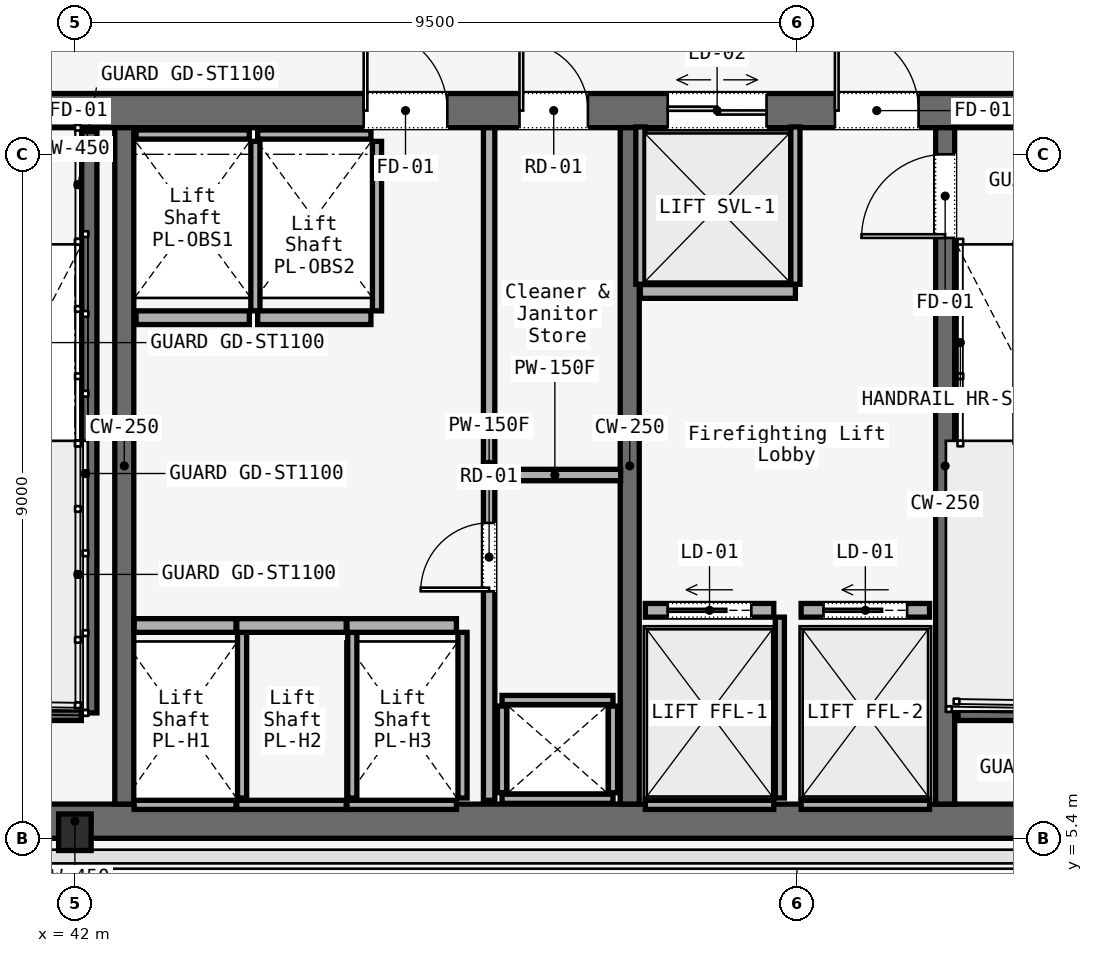
"""IFC4 building model, lengths in metres.
Left out: names, types, materials, properties, quantities, classifications, styles, units other than length and angle.
Written with IfcOpenShell. Run it as: python <this file> out.ifc"""

import sys

from ifc_helpers import new_model, si_unit, direction, frame, frame_2d, origin, origin_2d, place, context, subcontext, project, spatial, rectangle, i_section, extrude, element, fill, save


model = new_model("IFC4")
c1 = context("Model", 3, precision=1e-05, world=origin(), true_north=direction((0.0, 1.0)))
c2 = subcontext(c1, "Body", "Model", "MODEL_VIEW")
j1 = project(units=[si_unit("LENGTHUNIT", "METRE"), si_unit("PLANEANGLEUNIT", "RADIAN")], contexts=[c1])
p1 = place(None, origin())
s1 = spatial("IfcSite", under=j1, at=p1, CompositionType="ELEMENT")
p2 = place(p1, origin())
s2 = spatial("IfcBuilding", under=s1, at=p2, CompositionType="ELEMENT")
p3 = place(p2, frame((0.0, 0.0, 130.8)))
s3 = spatial("IfcBuildingStorey", under=s2, at=p3, CompositionType="ELEMENT", Elevation=130.8)
p4 = place(p3, frame((26.45, 14.975, 0.0), z_axis=(0.0, 0.0, 1.0), x_axis=(1.0, 0.0, 0.0)))
e1 = element("IfcWall", 1, at=p4, inside=s3, PredefinedType="SOLIDWALL", context=c2, shape_type="SweptSolid", body=[
    extrude(rectangle(XDim=31.1, YDim=0.45, at=frame_2d((15.55, 0.0))), origin(), (0.0, 0.0, 1.0), 3.58),
])
p5 = place(p4, frame((1.65, 0.0, 0.0)))
e2 = element("IfcOpeningElement", 2, at=p5, cuts=e1, PredefinedType="OPENING", context=c2, shape_type="SweptSolid", body=[
    extrude(rectangle(XDim=1.1, YDim=2.2, at=frame_2d((0.55, 1.1))), frame((0.0, 0.225, 0.0), z_axis=(0.0, -1.0, 0.0), x_axis=(1.0, 0.0, 0.0)), (0.0, 0.0, 1.0), 0.45),
])
p6 = place(p4, frame((13.65, 0.0, 0.0)))
e3 = element("IfcOpeningElement", 3, at=p6, cuts=e1, PredefinedType="OPENING", context=c2, shape_type="SweptSolid", body=[
    extrude(rectangle(XDim=1.1, YDim=2.2, at=frame_2d((0.55, 1.1))), frame((0.0, 0.225, 0.0), z_axis=(0.0, -1.0, 0.0), x_axis=(1.0, 0.0, 0.0)), (0.0, 0.0, 1.0), 0.45),
])
p7 = place(p4, frame((25.55, 0.0, 0.0)))
e4 = element("IfcOpeningElement", 4, at=p7, cuts=e1, PredefinedType="OPENING", context=c2, shape_type="SweptSolid", body=[
    extrude(rectangle(XDim=1.1, YDim=2.2, at=frame_2d((0.55, 1.1))), frame((0.0, 0.225, 0.0), z_axis=(0.0, -1.0, 0.0), x_axis=(1.0, 0.0, 0.0)), (0.0, 0.0, 1.0), 0.45),
])
p8 = place(p4, frame((10.7, 0.0, 0.0)))
e5 = element("IfcOpeningElement", 5, at=p8, cuts=e1, PredefinedType="OPENING", context=c2, shape_type="SweptSolid", body=[
    extrude(rectangle(XDim=1.4, YDim=2.2, at=frame_2d((0.7, 1.1))), frame((0.0, 0.225, 0.0), z_axis=(0.0, -1.0, 0.0), x_axis=(1.0, 0.0, 0.0)), (0.0, 0.0, 1.0), 0.45),
])
p9 = place(p4, frame((19.35, 0.0, 0.0)))
e6 = element("IfcOpeningElement", 6, at=p9, cuts=e1, PredefinedType="OPENING", context=c2, shape_type="SweptSolid", body=[
    extrude(rectangle(XDim=1.1, YDim=2.2, at=frame_2d((0.55, 1.1))), frame((0.0, 0.225, 0.0), z_axis=(0.0, -1.0, 0.0), x_axis=(1.0, 0.0, 0.0)), (0.0, 0.0, 1.0), 0.45),
])
p10 = place(p4, frame((21.4, 0.0, 0.0)))
e7 = element("IfcOpeningElement", 7, at=p10, cuts=e1, PredefinedType="OPENING", context=c2, shape_type="SweptSolid", body=[
    extrude(rectangle(XDim=0.9, YDim=2.1, at=frame_2d((0.45, 1.05))), frame((0.0, 0.225, 0.0), z_axis=(0.0, -1.0, 0.0), x_axis=(1.0, 0.0, 0.0)), (0.0, 0.0, 1.0), 0.45),
])
p11 = place(p4, frame((23.35, 0.0, 0.0)))
e8 = element("IfcOpeningElement", 8, at=p11, cuts=e1, PredefinedType="OPENING", context=c2, shape_type="SweptSolid", body=[
    extrude(rectangle(XDim=1.3, YDim=2.3, at=frame_2d((0.65, 1.15))), frame((0.0, 0.225, 0.0), z_axis=(0.0, -1.0, 0.0), x_axis=(1.0, 0.0, 0.0)), (0.0, 0.0, 1.0), 0.45),
])
p12 = place(p3, frame((26.45, 5.625, 0.0), z_axis=(0.0, 0.0, 1.0), x_axis=(1.0, 0.0, 0.0)))
e9 = element("IfcWall", 9, at=p12, inside=s3, PredefinedType="SOLIDWALL", context=c2, shape_type="SweptSolid", body=[
    extrude(rectangle(XDim=31.1, YDim=0.45, at=frame_2d((15.55, 0.0))), origin(), (0.0, 0.0, 1.0), 3.58),
])
for number, where, z_axis, x_axis in (
    (10, (42.65, 5.85, 0.0), (0.0, 0.0, 1.0), (0.0, 1.0, 0.0)),
    (11, (49.3, 5.85, 0.0), (0.0, 0.0, 1.0), (0.0, 1.0, 0.0)),
):
    element("IfcWall", number, at=place(p3, frame(where, z_axis=z_axis, x_axis=x_axis)), inside=s3, PredefinedType="SOLIDWALL", context=c2, shape_type="SweptSolid", body=[
        extrude(rectangle(XDim=8.9, YDim=0.25, at=frame_2d((4.45, 0.0))), origin(), (0.0, 0.0, 1.0), 3.58),
    ])
p13 = place(p3, frame((53.45, 5.85, 0.0), z_axis=(0.0, 0.0, 1.0), x_axis=(0.0, 1.0, 0.0)))
e12 = element("IfcWall", 12, at=p13, inside=s3, PredefinedType="SOLIDWALL", context=c2, shape_type="SweptSolid", body=[
    extrude(rectangle(XDim=8.9, YDim=0.25, at=frame_2d((4.45, 0.0))), origin(), (0.0, 0.0, 1.0), 3.58),
])
p14 = place(p13, frame((7.45, 0.0, 0.0)))
e13 = element("IfcOpeningElement", 13, at=p14, cuts=e12, PredefinedType="OPENING", context=c2, shape_type="SweptSolid", body=[
    extrude(rectangle(XDim=1.1, YDim=2.2, at=frame_2d((0.55, 1.1))), frame((0.0, 0.125, 0.0), z_axis=(0.0, -1.0, 0.0), x_axis=(1.0, 0.0, 0.0)), (0.0, 0.0, 1.0), 0.25),
])
p15 = place(p3, frame((42.0, 5.48, 0.0), z_axis=(0.0, 0.0, 1.0), x_axis=(1.0, 0.0, 0.0)))
e14 = element("IfcColumn", 14, at=p15, inside=s3, PredefinedType="COLUMN", context=c2, shape_type="SweptSolid", body=[
    extrude(i_section(OverallWidth=0.428, OverallDepth=0.481, WebThickness=0.051, FlangeThickness=0.065, FilletRadius=0.015, at=origin_2d()), origin(), (0.0, 0.0, 1.0), 3.58),
])
p16 = place(p3, frame((42.19, 14.7, 0.0), z_axis=(0.0, 0.0, 1.0), x_axis=(0.0, -1.0, 0.0)))
e15 = element("IfcWall", 15, at=p16, inside=s3, PredefinedType="SOLIDWALL", context=c2, shape_type="SweptSolid", body=[
    extrude(rectangle(XDim=7.65, YDim=0.2, at=frame_2d((3.825, 0.0))), origin(), (0.0, 0.0, 1.0), 3.8),
])
for number, where, z_axis, x_axis in (
    (16, (38.97, 7.05, 0.0), (0.0, 0.0, 1.0), (1.0, 0.0, 0.0)),
    (17, (53.62, 7.05, 0.0), (0.0, 0.0, 1.0), (1.0, 0.0, 0.0)),
):
    element("IfcWall", number, at=place(p3, frame(where, z_axis=z_axis, x_axis=x_axis)), inside=s3, PredefinedType="SOLIDWALL", context=c2, shape_type="SweptSolid", body=[
        extrude(rectangle(XDim=3.115, YDim=0.2, at=frame_2d((1.558, 0.0))), origin(), (0.0, 0.0, 1.0), 3.8),
    ])
for number, where, z_axis, x_axis in (
    (18, (47.62, 5.92, 0.0), (0.0, 0.0, 1.0), (1.0, 0.0, 0.0)),
    (19, (47.62, 7.22, 0.0), (0.0, 0.0, 1.0), (1.0, 0.0, 0.0)),
):
    element("IfcWall", number, at=place(p3, frame(where, z_axis=z_axis, x_axis=x_axis)), inside=s3, PredefinedType="SOLIDWALL", context=c2, shape_type="SweptSolid", body=[
        extrude(rectangle(XDim=1.46, YDim=0.12, at=frame_2d((0.73, 0.0))), origin(), (0.0, 0.0, 1.0), 3.01),
    ])
for number, where, z_axis, x_axis in (
    (20, (47.62, 6.0, 0.0), (0.0, 0.0, 1.0), (0.0, 1.0, 0.0)),
    (21, (49.08, 6.0, 0.0), (0.0, 0.0, 1.0), (0.0, 1.0, 0.0)),
):
    element("IfcWall", number, at=place(p3, frame(where, z_axis=z_axis, x_axis=x_axis)), inside=s3, PredefinedType="SOLIDWALL", context=c2, shape_type="SweptSolid", body=[
        extrude(rectangle(XDim=1.14, YDim=0.12, at=frame_2d((0.57, 0.0))), origin(), (0.0, 0.0, 1.0), 3.01),
    ])
p17 = place(p3, frame((47.45, 5.9, 0.0), z_axis=(0.0, 0.0, 1.0), x_axis=(0.0, 1.0, 0.0)))
e22 = element("IfcWall", 22, at=p17, inside=s3, PredefinedType="PARTITIONING", context=c2, shape_type="SweptSolid", body=[
    extrude(rectangle(XDim=8.85, YDim=0.15, at=frame_2d((4.425, 0.0))), origin(), (0.0, 0.0, 1.0), 3.01),
])
p18 = place(p17, frame((2.75, 0.0, 0.0)))
e23 = element("IfcOpeningElement", 23, at=p18, cuts=e22, PredefinedType="OPENING", context=c2, shape_type="SweptSolid", body=[
    extrude(rectangle(XDim=0.9, YDim=2.1, at=frame_2d((0.45, 1.05))), frame((0.0, 0.075, 0.0), z_axis=(0.0, -1.0, 0.0), x_axis=(1.0, 0.0, 0.0)), (0.0, 0.0, 1.0), 0.15),
])
p19 = place(p3, frame((47.45, 10.18, 0.0), z_axis=(0.0, 0.0, 1.0), x_axis=(1.0, 0.0, 0.0)))
e24 = element("IfcWall", 24, at=p19, inside=s3, PredefinedType="PARTITIONING", context=c2, shape_type="SweptSolid", body=[
    extrude(rectangle(XDim=1.73, YDim=0.15, at=frame_2d((0.865, 0.0))), origin(), (0.0, 0.0, 1.0), 3.01),
])
p20 = place(p3, frame((42.78, 8.2, 0.0), z_axis=(0.0, 0.0, 1.0), x_axis=(1.0, 0.0, 0.0)))
e25 = element("IfcWall", 25, at=p20, inside=s3, PredefinedType="SOLIDWALL", context=c2, shape_type="SweptSolid", body=[
    extrude(rectangle(XDim=1.34, YDim=0.18, at=frame_2d((0.67, 0.0))), origin(), (0.0, 0.0, 1.0), 3.01),
])
p21 = place(p3, frame((42.78, 5.84, 0.0), z_axis=(0.0, 0.0, 1.0), x_axis=(1.0, 0.0, 0.0)))
e26 = element("IfcWall", 26, at=p21, inside=s3, PredefinedType="SOLIDWALL", context=c2, shape_type="SweptSolid", body=[
    extrude(rectangle(XDim=1.34, YDim=0.12, at=frame_2d((0.67, 0.0))), origin(), (0.0, 0.0, 1.0), 3.01),
])
p22 = place(p3, frame((44.2, 5.93, 0.0), z_axis=(0.0, 0.0, 1.0), x_axis=(0.0, 1.0, 0.0)))
e27 = element("IfcWall", 27, at=p22, inside=s3, PredefinedType="SOLIDWALL", context=c2, shape_type="SweptSolid", body=[
    extrude(rectangle(XDim=2.18, YDim=0.12, at=frame_2d((1.09, 0.0))), origin(), (0.0, 0.0, 1.0), 3.01),
])
p23 = place(p3, frame((44.13, 8.2, 0.0), z_axis=(0.0, 0.0, 1.0), x_axis=(1.0, 0.0, 0.0)))
e28 = element("IfcWall", 28, at=p23, inside=s3, PredefinedType="SOLIDWALL", context=c2, shape_type="SweptSolid", body=[
    extrude(rectangle(XDim=1.44, YDim=0.18, at=frame_2d((0.72, 0.0))), origin(), (0.0, 0.0, 1.0), 3.01),
])
p24 = place(p3, frame((44.13, 5.84, 0.0), z_axis=(0.0, 0.0, 1.0), x_axis=(1.0, 0.0, 0.0)))
e29 = element("IfcWall", 29, at=p24, inside=s3, PredefinedType="SOLIDWALL", context=c2, shape_type="SweptSolid", body=[
    extrude(rectangle(XDim=1.44, YDim=0.12, at=frame_2d((0.72, 0.0))), origin(), (0.0, 0.0, 1.0), 3.01),
])
p25 = place(p3, frame((45.65, 5.93, 0.0), z_axis=(0.0, 0.0, 1.0), x_axis=(0.0, 1.0, 0.0)))
e30 = element("IfcWall", 30, at=p25, inside=s3, PredefinedType="SOLIDWALL", context=c2, shape_type="SweptSolid", body=[
    extrude(rectangle(XDim=2.18, YDim=0.12, at=frame_2d((1.09, 0.0))), origin(), (0.0, 0.0, 1.0), 3.01),
])
p26 = place(p3, frame((45.58, 8.2, 0.0), z_axis=(0.0, 0.0, 1.0), x_axis=(1.0, 0.0, 0.0)))
e31 = element("IfcWall", 31, at=p26, inside=s3, PredefinedType="SOLIDWALL", context=c2, shape_type="SweptSolid", body=[
    extrude(rectangle(XDim=1.44, YDim=0.18, at=frame_2d((0.72, 0.0))), origin(), (0.0, 0.0, 1.0), 3.01),
])
p27 = place(p3, frame((45.58, 5.84, 0.0), z_axis=(0.0, 0.0, 1.0), x_axis=(1.0, 0.0, 0.0)))
e32 = element("IfcWall", 32, at=p27, inside=s3, PredefinedType="SOLIDWALL", context=c2, shape_type="SweptSolid", body=[
    extrude(rectangle(XDim=1.44, YDim=0.12, at=frame_2d((0.72, 0.0))), origin(), (0.0, 0.0, 1.0), 3.01),
])
p28 = place(p3, frame((47.1, 5.93, 0.0), z_axis=(0.0, 0.0, 1.0), x_axis=(0.0, 1.0, 0.0)))
e33 = element("IfcWall", 33, at=p28, inside=s3, PredefinedType="SOLIDWALL", context=c2, shape_type="SweptSolid", body=[
    extrude(rectangle(XDim=2.18, YDim=0.12, at=frame_2d((1.09, 0.0))), origin(), (0.0, 0.0, 1.0), 3.01),
])
p29 = place(p3, frame((42.805, 12.25, 0.0), z_axis=(0.0, 0.0, 1.0), x_axis=(1.0, 0.0, 0.0)))
e34 = element("IfcWall", 34, at=p29, inside=s3, PredefinedType="SOLIDWALL", context=c2, shape_type="SweptSolid", body=[
    extrude(rectangle(XDim=1.49, YDim=0.18, at=frame_2d((0.745, 0.0))), origin(), (0.0, 0.0, 1.0), 3.01),
])
p30 = place(p3, frame((42.805, 14.66, 0.0), z_axis=(0.0, 0.0, 1.0), x_axis=(1.0, 0.0, 0.0)))
e35 = element("IfcWall", 35, at=p30, inside=s3, PredefinedType="SOLIDWALL", context=c2, shape_type="SweptSolid", body=[
    extrude(rectangle(XDim=1.49, YDim=0.12, at=frame_2d((0.745, 0.0))), origin(), (0.0, 0.0, 1.0), 3.01),
])
p31 = place(p3, frame((44.375, 12.34, 0.0), z_axis=(0.0, 0.0, 1.0), x_axis=(0.0, 1.0, 0.0)))
e36 = element("IfcWall", 36, at=p31, inside=s3, PredefinedType="SOLIDWALL", context=c2, shape_type="SweptSolid", body=[
    extrude(rectangle(XDim=2.23, YDim=0.12, at=frame_2d((1.115, 0.0))), origin(), (0.0, 0.0, 1.0), 3.01),
])
p32 = place(p3, frame((44.405, 12.25, 0.0), z_axis=(0.0, 0.0, 1.0), x_axis=(1.0, 0.0, 0.0)))
e37 = element("IfcWall", 37, at=p32, inside=s3, PredefinedType="SOLIDWALL", context=c2, shape_type="SweptSolid", body=[
    extrude(rectangle(XDim=1.49, YDim=0.18, at=frame_2d((0.745, 0.0))), origin(), (0.0, 0.0, 1.0), 3.01),
])
p33 = place(p3, frame((44.405, 14.66, 0.0), z_axis=(0.0, 0.0, 1.0), x_axis=(1.0, 0.0, 0.0)))
e38 = element("IfcWall", 38, at=p33, inside=s3, PredefinedType="SOLIDWALL", context=c2, shape_type="SweptSolid", body=[
    extrude(rectangle(XDim=1.49, YDim=0.12, at=frame_2d((0.745, 0.0))), origin(), (0.0, 0.0, 1.0), 3.01),
])
p34 = place(p3, frame((45.975, 12.34, 0.0), z_axis=(0.0, 0.0, 1.0), x_axis=(0.0, 1.0, 0.0)))
e39 = element("IfcWall", 39, at=p34, inside=s3, PredefinedType="SOLIDWALL", context=c2, shape_type="SweptSolid", body=[
    extrude(rectangle(XDim=2.23, YDim=0.12, at=frame_2d((1.115, 0.0))), origin(), (0.0, 0.0, 1.0), 3.01),
])
p35 = place(p3, frame((49.505, 8.4, 0.0), z_axis=(0.0, 0.0, 1.0), x_axis=(1.0, 0.0, 0.0)))
e40 = element("IfcWall", 40, at=p35, inside=s3, PredefinedType="SOLIDWALL", context=c2, shape_type="SweptSolid", body=[
    extrude(rectangle(XDim=1.69, YDim=0.18, at=frame_2d((0.845, 0.0))), origin(), (0.0, 0.0, 1.0), 3.01),
])
p36 = place(p35, frame((0.295, 0.0, 0.0)))
e41 = element("IfcOpeningElement", 41, at=p36, cuts=e40, PredefinedType="OPENING", context=c2, shape_type="SweptSolid", body=[
    extrude(rectangle(XDim=1.1, YDim=2.2, at=frame_2d((0.55, 1.1))), frame((0.0, 0.09, 0.0), z_axis=(0.0, -1.0, 0.0), x_axis=(1.0, 0.0, 0.0)), (0.0, 0.0, 1.0), 0.18),
])
p37 = place(p3, frame((49.505, 5.84, 0.0), z_axis=(0.0, 0.0, 1.0), x_axis=(1.0, 0.0, 0.0)))
e42 = element("IfcWall", 42, at=p37, inside=s3, PredefinedType="SOLIDWALL", context=c2, shape_type="SweptSolid", body=[
    extrude(rectangle(XDim=1.69, YDim=0.12, at=frame_2d((0.845, 0.0))), origin(), (0.0, 0.0, 1.0), 3.01),
])
p38 = place(p3, frame((51.275, 5.93, 0.0), z_axis=(0.0, 0.0, 1.0), x_axis=(0.0, 1.0, 0.0)))
e43 = element("IfcWall", 43, at=p38, inside=s3, PredefinedType="SOLIDWALL", context=c2, shape_type="SweptSolid", body=[
    extrude(rectangle(XDim=2.38, YDim=0.12, at=frame_2d((1.19, 0.0))), origin(), (0.0, 0.0, 1.0), 3.01),
])
p39 = place(p3, frame((51.555, 8.4, 0.0), z_axis=(0.0, 0.0, 1.0), x_axis=(1.0, 0.0, 0.0)))
e44 = element("IfcWall", 44, at=p39, inside=s3, PredefinedType="SOLIDWALL", context=c2, shape_type="SweptSolid", body=[
    extrude(rectangle(XDim=1.69, YDim=0.18, at=frame_2d((0.845, 0.0))), origin(), (0.0, 0.0, 1.0), 3.01),
])
p40 = place(p39, frame((0.295, 0.0, 0.0)))
e45 = element("IfcOpeningElement", 45, at=p40, cuts=e44, PredefinedType="OPENING", context=c2, shape_type="SweptSolid", body=[
    extrude(rectangle(XDim=1.1, YDim=2.2, at=frame_2d((0.55, 1.1))), frame((0.0, 0.09, 0.0), z_axis=(0.0, -1.0, 0.0), x_axis=(1.0, 0.0, 0.0)), (0.0, 0.0, 1.0), 0.18),
])
p41 = place(p3, frame((51.555, 5.84, 0.0), z_axis=(0.0, 0.0, 1.0), x_axis=(1.0, 0.0, 0.0)))
e46 = element("IfcWall", 46, at=p41, inside=s3, PredefinedType="SOLIDWALL", context=c2, shape_type="SweptSolid", body=[
    extrude(rectangle(XDim=1.69, YDim=0.12, at=frame_2d((0.845, 0.0))), origin(), (0.0, 0.0, 1.0), 3.01),
])
p42 = place(p3, frame((49.44, 12.595, 0.0), z_axis=(0.0, 0.0, 1.0), x_axis=(1.0, 0.0, 0.0)))
e47 = element("IfcWall", 47, at=p42, inside=s3, PredefinedType="SOLIDWALL", context=c2, shape_type="SweptSolid", body=[
    extrude(rectangle(XDim=2.04, YDim=0.18, at=frame_2d((1.02, 0.0))), origin(), (0.0, 0.0, 1.0), 3.01),
])
for number, where, z_axis, x_axis in (
    (48, (49.44, 12.69, 0.0), (0.0, 0.0, 1.0), (0.0, 1.0, 0.0)),
    (49, (51.48, 12.69, 0.0), (0.0, 0.0, 1.0), (0.0, 1.0, 0.0)),
):
    element("IfcWall", number, at=place(p3, frame(where, z_axis=z_axis, x_axis=x_axis)), inside=s3, PredefinedType="SOLIDWALL", context=c2, shape_type="SweptSolid", body=[
        extrude(rectangle(XDim=2.07, YDim=0.12, at=frame_2d((1.035, 0.0))), origin(), (0.0, 0.0, 1.0), 3.01),
    ])
p43 = place(p7, origin())
e50 = element("IfcDoor", 50, at=p43, inside=s3, OperationType="SINGLE_SWING_RIGHT", PredefinedType="DOOR", context=c2, shape_type="SweptSolid", body=[
    extrude(rectangle(XDim=1.1, YDim=2.2, at=frame_2d((0.55, 1.1))), frame((0.0, 0.025, 0.0), z_axis=(0.0, -1.0, 0.0), x_axis=(1.0, 0.0, 0.0)), (0.0, 0.0, 1.0), 0.05),
])
fill(e4, e50)
p44 = place(p9, origin())
e51 = element("IfcDoor", 51, at=p44, inside=s3, OperationType="SINGLE_SWING_LEFT", PredefinedType="DOOR", context=c2, shape_type="SweptSolid", body=[
    extrude(rectangle(XDim=1.1, YDim=2.2, at=frame_2d((0.55, 1.1))), frame((0.0, 0.025, 0.0), z_axis=(0.0, -1.0, 0.0), x_axis=(1.0, 0.0, 0.0)), (0.0, 0.0, 1.0), 0.05),
])
fill(e6, e51)
p45 = place(p10, origin())
e52 = element("IfcDoor", 52, at=p45, inside=s3, OperationType="SINGLE_SWING_LEFT", PredefinedType="DOOR", context=c2, shape_type="SweptSolid", body=[
    extrude(rectangle(XDim=0.9, YDim=2.1, at=frame_2d((0.45, 1.05))), frame((0.0, 0.025, 0.0), z_axis=(0.0, -1.0, 0.0), x_axis=(1.0, 0.0, 0.0)), (0.0, 0.0, 1.0), 0.05),
])
fill(e7, e52)
p46 = place(p14, origin())
e53 = element("IfcDoor", 53, at=p46, inside=s3, OperationType="SINGLE_SWING_LEFT", PredefinedType="DOOR", context=c2, shape_type="SweptSolid", body=[
    extrude(rectangle(XDim=1.1, YDim=2.2, at=frame_2d((0.55, 1.1))), frame((0.0, 0.025, 0.0), z_axis=(0.0, -1.0, 0.0), x_axis=(1.0, 0.0, 0.0)), (0.0, 0.0, 1.0), 0.05),
])
fill(e13, e53)
p47 = place(p18, origin())
e54 = element("IfcDoor", 54, at=p47, inside=s3, OperationType="SINGLE_SWING_RIGHT", PredefinedType="DOOR", context=c2, shape_type="SweptSolid", body=[
    extrude(rectangle(XDim=0.9, YDim=2.1, at=frame_2d((0.45, 1.05))), frame((0.0, 0.025, 0.0), z_axis=(0.0, -1.0, 0.0), x_axis=(1.0, 0.0, 0.0)), (0.0, 0.0, 1.0), 0.05),
])
fill(e23, e54)
p48 = place(p36, origin())
e55 = element("IfcDoor", 55, at=p48, inside=s3, OperationType="SLIDING_TO_LEFT", PredefinedType="DOOR", context=c2, shape_type="SweptSolid", body=[
    extrude(rectangle(XDim=1.1, YDim=2.2, at=frame_2d((0.55, 1.1))), frame((0.0, 0.025, 0.0), z_axis=(0.0, -1.0, 0.0), x_axis=(1.0, 0.0, 0.0)), (0.0, 0.0, 1.0), 0.05),
])
fill(e41, e55)
p49 = place(p40, origin())
e56 = element("IfcDoor", 56, at=p49, inside=s3, OperationType="SLIDING_TO_LEFT", PredefinedType="DOOR", context=c2, shape_type="SweptSolid", body=[
    extrude(rectangle(XDim=1.1, YDim=2.2, at=frame_2d((0.55, 1.1))), frame((0.0, 0.025, 0.0), z_axis=(0.0, -1.0, 0.0), x_axis=(1.0, 0.0, 0.0)), (0.0, 0.0, 1.0), 0.05),
])
fill(e45, e56)
p50 = place(p11, origin())
e57 = element("IfcDoor", 57, at=p50, inside=s3, OperationType="DOUBLE_DOOR_SLIDING", PredefinedType="DOOR", context=c2, shape_type="SweptSolid", body=[
    extrude(rectangle(XDim=1.3, YDim=2.3, at=frame_2d((0.65, 1.15))), frame((0.0, 0.025, 0.0), z_axis=(0.0, -1.0, 0.0), x_axis=(1.0, 0.0, 0.0)), (0.0, 0.0, 1.0), 0.05),
])
fill(e8, e57)
save(model, sys.argv[1])
